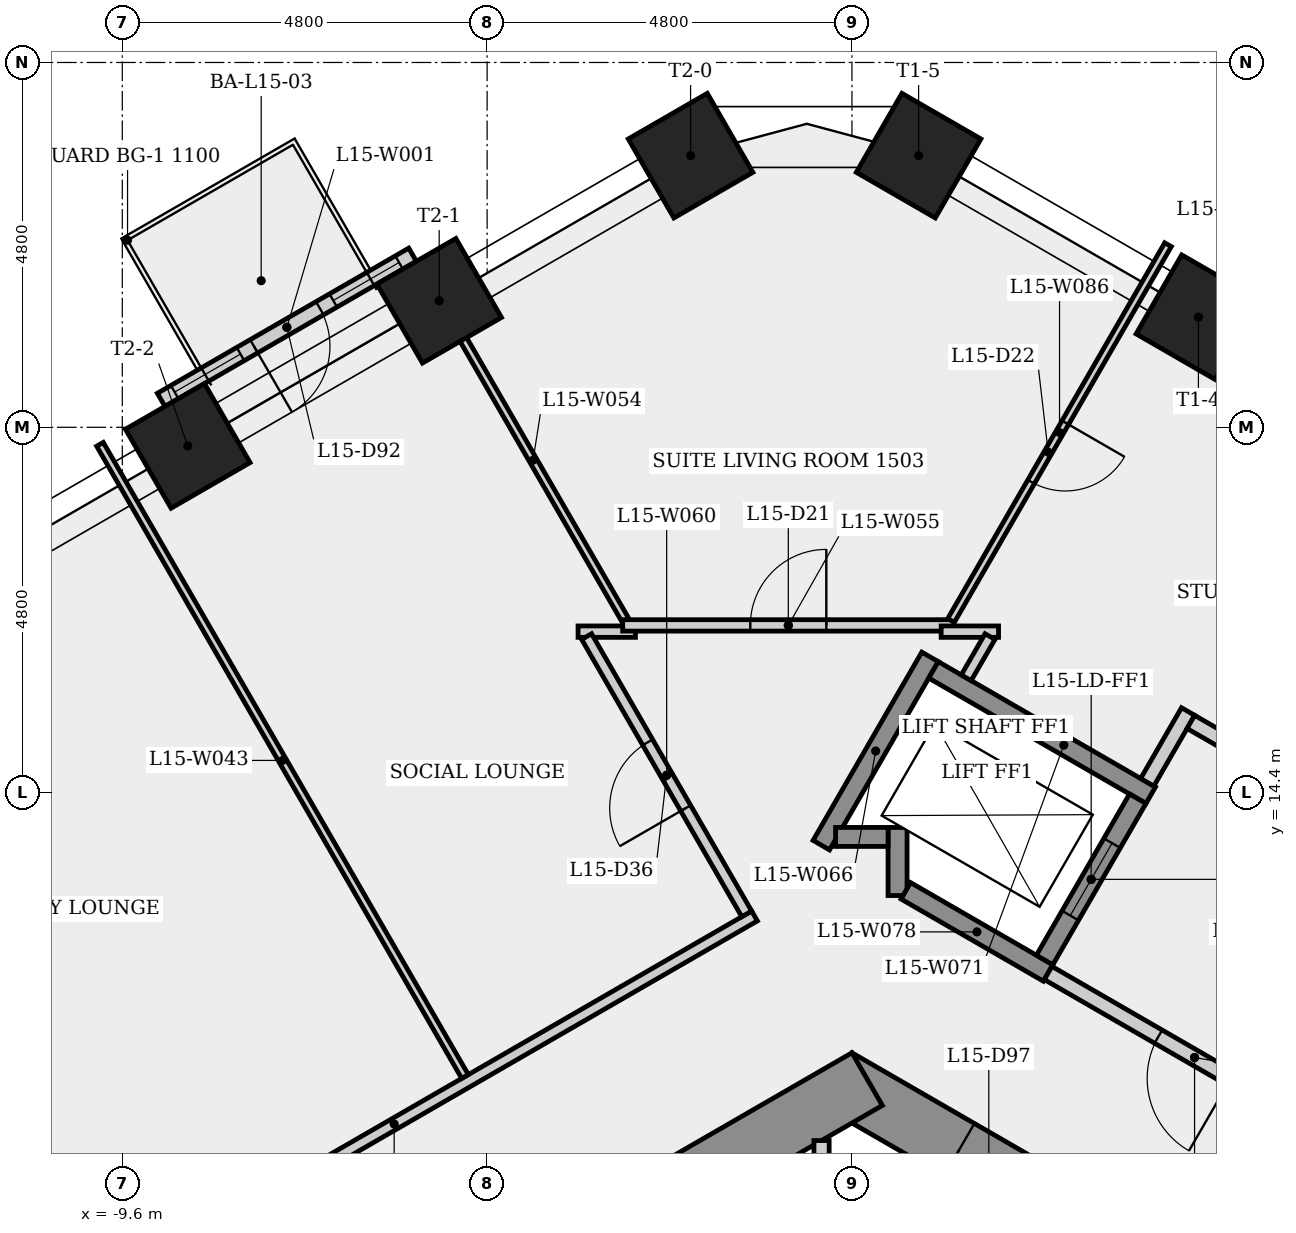
"""IFC4 building model, lengths in metres.
Left out: names, types, materials, properties, quantities, classifications, styles, units other than length and angle.
Written with IfcOpenShell. Run it as: python <this file> out.ifc"""

import sys

from ifc_helpers import new_model, si_unit, direction, frame, frame_2d, origin, origin_2d, place, context, subcontext, project, spatial, rectangle, extrude, element, fill, save


model = new_model("IFC4")
c1 = context("Model", 3, precision=1e-05, world=origin(), true_north=direction((0.0, 1.0)))
c2 = subcontext(c1, "Body", "Model", "MODEL_VIEW")
j1 = project(units=[si_unit("LENGTHUNIT", "METRE"), si_unit("PLANEANGLEUNIT", "RADIAN")], contexts=[c1])
p1 = place(None, origin())
s1 = spatial("IfcSite", under=j1, at=p1, CompositionType="ELEMENT")
p2 = place(p1, origin())
s2 = spatial("IfcBuilding", under=s1, at=p2, CompositionType="ELEMENT")
p3 = place(p2, frame((0.0, 0.0, 59.5)))
s3 = spatial("IfcBuildingStorey", under=s2, at=p3, CompositionType="ELEMENT", Elevation=59.5)
p4 = place(p3, frame((9.3, 5.138, 0.0), z_axis=(0.0, 0.0, 1.0), x_axis=(-0.866023993627, 0.500002442456, 0.0)))
e1 = element("IfcWall", 1, at=p4, inside=s3, PredefinedType="SHEAR", context=c2, shape_type="SweptSolid", body=[
    extrude(rectangle(XDim=10.97, YDim=0.8, at=frame_2d((5.485, 0.0))), origin(), (0.0, 0.0, 1.0), 3.4),
])
p5 = place(p4, frame((8.21, 0.0, 0.0)))
e2 = element("IfcOpeningElement", 2, at=p5, cuts=e1, PredefinedType="OPENING", context=c2, shape_type="SweptSolid", body=[
    extrude(rectangle(XDim=0.9, YDim=2.1, at=frame_2d((0.45, 1.05))), frame((0.0, 0.41, 0.0), z_axis=(0.0, -1.0, 0.0), x_axis=(1.0, 0.0, 0.0)), (0.0, 0.0, 1.0), 0.82),
])
p6 = place(p4, frame((2.126, 0.0, 0.0)))
e3 = element("IfcOpeningElement", 3, at=p6, cuts=e1, PredefinedType="OPENING", context=c2, shape_type="SweptSolid", body=[
    extrude(rectangle(XDim=0.9, YDim=2.1, at=frame_2d((0.45, 1.05))), frame((0.0, 0.41, 0.0), z_axis=(0.0, -1.0, 0.0), x_axis=(1.0, 0.0, 0.0)), (0.0, 0.0, 1.0), 0.82),
])
p7 = place(p3, frame((0.2, 10.623, 0.0), z_axis=(0.0, 0.0, 1.0), x_axis=(-0.866023993627, -0.500002442456, 0.0)))
e4 = element("IfcWall", 4, at=p7, inside=s3, PredefinedType="SHEAR", context=c2, shape_type="SweptSolid", body=[
    extrude(rectangle(XDim=10.97, YDim=0.8, at=frame_2d((5.485, 0.0))), origin(), (0.0, 0.0, 1.0), 3.4),
])
p8 = place(p7, frame((6.877, 0.0, 0.0)))
e5 = element("IfcOpeningElement", 5, at=p8, cuts=e4, PredefinedType="OPENING", context=c2, shape_type="SweptSolid", body=[
    extrude(rectangle(XDim=0.9, YDim=2.1, at=frame_2d((0.45, 1.05))), frame((0.0, 0.41, 0.0), z_axis=(0.0, -1.0, 0.0), x_axis=(1.0, 0.0, 0.0)), (0.0, 0.0, 1.0), 0.82),
])
for number, where, z_axis, x_axis in (
    (6, (4.558, 20.649, 0.0), (0.0, 0.0, 1.0), (0.5, 0.866, 0.0)),
    (7, (0.877, 22.774, 0.0), (0.0, 0.0, 1.0), (0.5, 0.866, 0.0)),
    (8, (-2.123, 22.774, 0.0), (0.0, 0.0, 1.0), (-0.5, 0.866, 0.0)),
    (9, (-5.431, 20.865, 0.0), (0.0, 0.0, 1.0), (-0.5, 0.866, 0.0)),
    (10, (-8.739, 18.955, 0.0), (0.0, 0.0, 1.0), (-0.5, 0.866, 0.0)),
):
    element("IfcColumn", number, at=place(p3, frame(where, z_axis=z_axis, x_axis=x_axis)), inside=s3, PredefinedType="COLUMN", context=c2, shape_type="SweptSolid", body=[
        extrude(rectangle(XDim=1.2, YDim=1.2, at=origin_2d()), origin(), (0.0, 0.0, 1.0), 3.4),
    ])
p9 = place(p3, frame((-5.781, 21.471, 0.0), z_axis=(0.0, 0.0, 1.0), x_axis=(-0.866007800909, -0.500030487836, 0.0)))
e11 = element("IfcWall", 11, at=p9, inside=s3, PredefinedType="SOLIDWALL", context=c2, shape_type="SweptSolid", body=[
    extrude(rectangle(XDim=3.819, YDim=0.2, at=frame_2d((1.91, 0.0))), origin(), (0.0, 0.0, 1.0), 3.4),
])
p10 = place(p9, frame((1.409, 0.0, 0.0)))
e12 = element("IfcOpeningElement", 12, at=p10, cuts=e11, PredefinedType="OPENING", context=c2, shape_type="SweptSolid", body=[
    extrude(rectangle(XDim=1.0, YDim=2.4, at=frame_2d((0.5, 1.2))), frame((0.0, 0.11, 0.0), z_axis=(0.0, -1.0, 0.0), x_axis=(1.0, 0.0, 0.0)), (0.0, 0.0, 1.0), 0.22),
])
p11 = place(p9, frame((0.205, 0.0, 0.9)))
e13 = element("IfcOpeningElement", 13, at=p11, cuts=e11, PredefinedType="OPENING", context=c2, shape_type="SweptSolid", body=[
    extrude(rectangle(XDim=1.0, YDim=1.5, at=frame_2d((0.5, 0.75))), frame((0.0, 0.11, 0.0), z_axis=(0.0, -1.0, 0.0), x_axis=(1.0, 0.0, 0.0)), (0.0, 0.0, 1.0), 0.22),
])
p12 = place(p9, frame((2.614, 0.0, 0.9)))
e14 = element("IfcOpeningElement", 14, at=p12, cuts=e11, PredefinedType="OPENING", context=c2, shape_type="SweptSolid", body=[
    extrude(rectangle(XDim=1.0, YDim=1.5, at=frame_2d((0.5, 0.75))), frame((0.0, 0.11, 0.0), z_axis=(0.0, -1.0, 0.0), x_axis=(1.0, 0.0, 0.0)), (0.0, 0.0, 1.0), 0.22),
])
p13 = place(p3, frame((-10.764, 7.295, 0.0), z_axis=(0.0, 0.0, 1.0), x_axis=(0.866028150195, 0.499995243048, 0.0)))
e15 = element("IfcWall", 15, at=p13, inside=s3, PredefinedType="PARTITIONING", context=c2, shape_type="SweptSolid", body=[
    extrude(rectangle(XDim=10.949, YDim=0.15, at=frame_2d((5.475, 0.0))), origin(), (0.0, 0.0, 1.0), 3.05),
])
p14 = place(p3, frame((-5.091, 10.657, 0.0), z_axis=(0.0, 0.0, 1.0), x_axis=(-0.499998937792, 0.866026017049, 0.0)))
e16 = element("IfcWall", 16, at=p14, inside=s3, PredefinedType="PARTITIONING", context=c2, shape_type="SweptSolid", body=[
    extrude(rectangle(XDim=9.605, YDim=0.1, at=frame_2d((4.803, 0.0))), origin(), (0.0, 0.0, 1.0), 3.05),
])
p15 = place(p3, frame((-3.604, 16.511, 0.0), z_axis=(0.0, 0.0, 1.0), x_axis=(1.0, 0.0, 0.0)))
e17 = element("IfcWall", 17, at=p15, inside=s3, PredefinedType="PARTITIONING", context=c2, shape_type="SweptSolid", body=[
    extrude(rectangle(XDim=0.755, YDim=0.15, at=frame_2d((0.377, 0.0))), origin(), (0.0, 0.0, 1.0), 3.05),
])
p16 = place(p3, frame((-2.979, 16.658, 0.0), z_axis=(0.0, 0.0, 1.0), x_axis=(-0.500021943523, 0.866012734315, 0.0)))
e18 = element("IfcWall", 18, at=p16, inside=s3, PredefinedType="PARTITIONING", context=c2, shape_type="SweptSolid", body=[
    extrude(rectangle(XDim=4.869, YDim=0.1, at=frame_2d((2.435, 0.0))), origin(), (0.0, 0.0, 1.0), 3.05),
])
p17 = place(p3, frame((-3.016, 16.593, 0.0), z_axis=(0.0, 0.0, 1.0), x_axis=(1.0, 0.0, 0.0)))
e19 = element("IfcWall", 19, at=p17, inside=s3, PredefinedType="PARTITIONING", context=c2, shape_type="SweptSolid", body=[
    extrude(rectangle(XDim=4.357, YDim=0.15, at=frame_2d((2.179, 0.0))), origin(), (0.0, 0.0, 1.0), 3.05),
])
p18 = place(p17, frame((1.679, 0.0, 0.0)))
e20 = element("IfcOpeningElement", 20, at=p18, cuts=e19, PredefinedType="OPENING", context=c2, shape_type="SweptSolid", body=[
    extrude(rectangle(XDim=1.0, YDim=2.1, at=frame_2d((0.5, 1.05))), frame((0.0, 0.085, 0.0), z_axis=(0.0, -1.0, 0.0), x_axis=(1.0, 0.0, 0.0)), (0.0, 0.0, 1.0), 0.17),
])
p19 = place(p3, frame((-1.385, 12.797, 0.0), z_axis=(0.0, 0.0, 1.0), x_axis=(-0.499996648386, 0.866027338831, 0.0)))
e21 = element("IfcWall", 21, at=p19, inside=s3, PredefinedType="PARTITIONING", context=c2, shape_type="SweptSolid", body=[
    extrude(rectangle(XDim=4.213, YDim=0.15, at=frame_2d((2.107, 0.0))), origin(), (0.0, 0.0, 1.0), 3.05),
])
p20 = place(p19, frame((1.607, 0.0, 0.0)))
e22 = element("IfcOpeningElement", 22, at=p20, cuts=e21, PredefinedType="OPENING", context=c2, shape_type="SweptSolid", body=[
    extrude(rectangle(XDim=1.0, YDim=2.1, at=frame_2d((0.5, 1.05))), frame((0.0, 0.085, 0.0), z_axis=(0.0, -1.0, 0.0), x_axis=(1.0, 0.0, 0.0)), (0.0, 0.0, 1.0), 0.17),
])
p21 = place(p3, frame((-0.4, 9.815, 0.0), z_axis=(0.0, 0.0, 1.0), x_axis=(0.0, -1.0, 0.0)))
e23 = element("IfcWall", 23, at=p21, inside=s3, PredefinedType="PARTITIONING", context=c2, shape_type="SweptSolid", body=[
    extrude(rectangle(XDim=4.54, YDim=0.2, at=frame_2d((2.27, 0.0))), origin(), (0.0, 0.0, 1.0), 3.05),
])
p22 = place(p3, frame((-0.403, 13.702, 0.0), z_axis=(0.0, 0.0, 1.0), x_axis=(0.499976111731, 0.866039195244, 0.0)))
e24 = element("IfcWall", 24, at=p22, inside=s3, PredefinedType="SHEAR", context=c2, shape_type="SweptSolid", body=[
    extrude(rectangle(XDim=2.861, YDim=0.25, at=frame_2d((1.43, 0.0))), origin(), (0.0, 0.0, 1.0), 3.05),
])
p23 = place(p3, frame((0.6, 13.039, 0.0), z_axis=(0.0, 0.0, 1.0), x_axis=(0.0, 1.0, 0.0)))
e25 = element("IfcWall", 25, at=p23, inside=s3, PredefinedType="SHEAR", context=c2, shape_type="SweptSolid", body=[
    extrude(rectangle(XDim=0.896, YDim=0.25, at=frame_2d((0.448, 0.0))), origin(), (0.0, 0.0, 1.0), 3.05),
])
p24 = place(p3, frame((0.475, 13.81, 0.0), z_axis=(0.0, 0.0, 1.0), x_axis=(-1.0, 0.0, 0.0)))
e26 = element("IfcWall", 26, at=p24, inside=s3, PredefinedType="SHEAR", context=c2, shape_type="SweptSolid", body=[
    extrude(rectangle(XDim=0.691, YDim=0.25, at=frame_2d((0.345, 0.0))), origin(), (0.0, 0.0, 1.0), 3.4),
])
p25 = place(p3, frame((1.073, 16.008, 0.0), z_axis=(0.0, 0.0, 1.0), x_axis=(0.866040211805, -0.499974350878, 0.0)))
e27 = element("IfcWall", 27, at=p25, inside=s3, PredefinedType="SHEAR", context=c2, shape_type="SweptSolid", body=[
    extrude(rectangle(XDim=3.3, YDim=0.25, at=frame_2d((1.65, 0.0))), origin(), (0.0, 0.0, 1.0), 3.05),
])
p26 = place(p3, frame((1.174, 16.511, 0.0), z_axis=(0.0, 0.0, 1.0), x_axis=(1.0, 0.0, 0.0)))
e28 = element("IfcWall", 28, at=p26, inside=s3, PredefinedType="PARTITIONING", context=c2, shape_type="SweptSolid", body=[
    extrude(rectangle(XDim=0.755, YDim=0.15, at=frame_2d((0.377, 0.0))), origin(), (0.0, 0.0, 1.0), 3.05),
])
p27 = place(p3, frame((1.816, 16.446, 0.0), z_axis=(0.0, 0.0, 1.0), x_axis=(-0.50008261738, -0.865977699363, 0.0)))
e29 = element("IfcWall", 29, at=p27, inside=s3, PredefinedType="PARTITIONING", context=c2, shape_type="SweptSolid", body=[
    extrude(rectangle(XDim=0.626, YDim=0.15, at=frame_2d((0.313, 0.0))), origin(), (0.0, 0.0, 1.0), 3.05),
])
p28 = place(p3, frame((2.581, 12.02, 0.0), z_axis=(0.0, 0.0, 1.0), x_axis=(-0.86603892542, 0.499976579108, 0.0)))
e30 = element("IfcWall", 30, at=p28, inside=s3, PredefinedType="SHEAR", context=c2, shape_type="SweptSolid", body=[
    extrude(rectangle(XDim=2.162, YDim=0.25, at=frame_2d((1.081, 0.0))), origin(), (0.0, 0.0, 1.0), 3.05),
])
p29 = place(p3, frame((2.535, 12.191, 0.0), z_axis=(0.0, 0.0, 1.0), x_axis=(0.500061746146, 0.865989751695, 0.0)))
e31 = element("IfcWall", 31, at=p29, inside=s3, PredefinedType="SHEAR", context=c2, shape_type="SweptSolid", body=[
    extrude(rectangle(XDim=2.45, YDim=0.25, at=frame_2d((1.225, 0.0))), origin(), (0.0, 0.0, 1.0), 3.4),
])
p30 = place(p29, frame((0.675, 0.0, 0.0)))
e32 = element("IfcOpeningElement", 32, at=p30, cuts=e31, PredefinedType="OPENING", context=c2, shape_type="SweptSolid", body=[
    extrude(rectangle(XDim=1.1, YDim=2.1, at=frame_2d((0.55, 1.05))), frame((0.0, 0.135, 0.0), z_axis=(0.0, -1.0, 0.0), x_axis=(1.0, 0.0, 0.0)), (0.0, 0.0, 1.0), 0.27),
])
p31 = place(p3, frame((3.885, 14.529, 0.0), z_axis=(0.0, 0.0, 1.0), x_axis=(0.499997628298, 0.866026773083, 0.0)))
e33 = element("IfcWall", 33, at=p31, inside=s3, PredefinedType="PARTITIONING", context=c2, shape_type="SweptSolid", body=[
    extrude(rectangle(XDim=1.075, YDim=0.2, at=frame_2d((0.538, 0.0))), origin(), (0.0, 0.0, 1.0), 3.05),
])
p32 = place(p3, frame((4.158, 21.602, 0.0), z_axis=(0.0, 0.0, 1.0), x_axis=(-0.500002556202, -0.866023927955, 0.0)))
e34 = element("IfcWall", 34, at=p32, inside=s3, PredefinedType="PARTITIONING", context=c2, shape_type="SweptSolid", body=[
    extrude(rectangle(XDim=5.709, YDim=0.1, at=frame_2d((2.854, 0.0))), origin(), (0.0, 0.0, 1.0), 3.05),
])
p33 = place(p32, frame((2.702, 0.0, 0.0)))
e35 = element("IfcOpeningElement", 35, at=p33, cuts=e34, PredefinedType="OPENING", context=c2, shape_type="SweptSolid", body=[
    extrude(rectangle(XDim=0.9, YDim=2.1, at=frame_2d((0.45, 1.05))), frame((0.0, 0.06, 0.0), z_axis=(0.0, -1.0, 0.0), x_axis=(1.0, 0.0, 0.0)), (0.0, 0.0, 1.0), 0.12),
])
p34 = place(p3, frame((4.459, 15.323, 0.0), z_axis=(0.0, 0.0, 1.0), x_axis=(0.866016039709, -0.500016218704, 0.0)))
e36 = element("IfcWall", 36, at=p34, inside=s3, PredefinedType="PARTITIONING", context=c2, shape_type="SweptSolid", body=[
    extrude(rectangle(XDim=4.7, YDim=0.2, at=frame_2d((2.35, 0.0))), origin(), (0.0, 0.0, 1.0), 3.05),
])
p35 = place(p3, frame((6.435, 9.795, 0.0), z_axis=(0.0, 0.0, 1.0), x_axis=(-0.866012907634, 0.500021643343, 0.0)))
e37 = element("IfcWall", 37, at=p35, inside=s3, PredefinedType="PARTITIONING", context=c2, shape_type="SweptSolid", body=[
    extrude(rectangle(XDim=4.45, YDim=0.2, at=frame_2d((2.225, 0.0))), origin(), (0.0, 0.0, 1.0), 3.05),
])
p36 = place(p35, frame((1.675, 0.0, 0.0)))
e38 = element("IfcOpeningElement", 38, at=p36, cuts=e37, PredefinedType="OPENING", context=c2, shape_type="SweptSolid", body=[
    extrude(rectangle(XDim=1.1, YDim=2.1, at=frame_2d((0.55, 1.05))), frame((0.0, 0.11, 0.0), z_axis=(0.0, -1.0, 0.0), x_axis=(1.0, 0.0, 0.0)), (0.0, 0.0, 1.0), 0.22),
])
p37 = place(p10, origin())
e39 = element("IfcDoor", 39, at=p37, inside=s3, OperationType="SINGLE_SWING_RIGHT", PredefinedType="DOOR", context=c2, shape_type="SweptSolid", body=[
    extrude(rectangle(XDim=1.0, YDim=2.4, at=frame_2d((0.5, 1.2))), frame((0.0, 0.025, 0.0), z_axis=(0.0, -1.0, 0.0), x_axis=(1.0, 0.0, 0.0)), (0.0, 0.0, 1.0), 0.05),
])
fill(e12, e39)
p38 = place(p11, origin())
e40 = element("IfcWindow", 40, at=p38, inside=s3, PartitioningType="SINGLE_PANEL", PredefinedType="WINDOW", context=c2, shape_type="SweptSolid", body=[
    extrude(rectangle(XDim=1.0, YDim=1.5, at=frame_2d((0.5, 0.75))), frame((0.0, 0.03, 0.0), z_axis=(0.0, -1.0, 0.0), x_axis=(1.0, 0.0, 0.0)), (0.0, 0.0, 1.0), 0.06),
])
fill(e13, e40)
p39 = place(p12, origin())
e41 = element("IfcWindow", 41, at=p39, inside=s3, PartitioningType="SINGLE_PANEL", PredefinedType="WINDOW", context=c2, shape_type="SweptSolid", body=[
    extrude(rectangle(XDim=1.0, YDim=1.5, at=frame_2d((0.5, 0.75))), frame((0.0, 0.03, 0.0), z_axis=(0.0, -1.0, 0.0), x_axis=(1.0, 0.0, 0.0)), (0.0, 0.0, 1.0), 0.06),
])
fill(e14, e41)
p40 = place(p36, origin())
e42 = element("IfcDoor", 42, at=p40, inside=s3, OperationType="SINGLE_SWING_LEFT", PredefinedType="DOOR", context=c2, shape_type="SweptSolid", body=[
    extrude(rectangle(XDim=1.1, YDim=2.1, at=frame_2d((0.55, 1.05))), frame((0.0, 0.025, 0.0), z_axis=(0.0, -1.0, 0.0), x_axis=(1.0, 0.0, 0.0)), (0.0, 0.0, 1.0), 0.05),
])
fill(e38, e42)
p41 = place(p30, origin())
e43 = element("IfcDoor", 43, at=p41, inside=s3, OperationType="SLIDING_TO_LEFT", PredefinedType="DOOR", context=c2, shape_type="SweptSolid", body=[
    extrude(rectangle(XDim=1.1, YDim=2.1, at=frame_2d((0.55, 1.05))), frame((0.0, 0.025, 0.0), z_axis=(0.0, -1.0, 0.0), x_axis=(1.0, 0.0, 0.0)), (0.0, 0.0, 1.0), 0.05),
])
fill(e32, e43)
p42 = place(p18, origin())
e44 = element("IfcDoor", 44, at=p42, inside=s3, OperationType="SINGLE_SWING_RIGHT", PredefinedType="DOOR", context=c2, shape_type="SweptSolid", body=[
    extrude(rectangle(XDim=1.0, YDim=2.1, at=frame_2d((0.5, 1.05))), frame((0.0, 0.025, 0.0), z_axis=(0.0, -1.0, 0.0), x_axis=(1.0, 0.0, 0.0)), (0.0, 0.0, 1.0), 0.05),
])
fill(e20, e44)
p43 = place(p33, origin())
e45 = element("IfcDoor", 45, at=p43, inside=s3, OperationType="SINGLE_SWING_LEFT", PredefinedType="DOOR", context=c2, shape_type="SweptSolid", body=[
    extrude(rectangle(XDim=0.9, YDim=2.1, at=frame_2d((0.45, 1.05))), frame((0.0, 0.025, 0.0), z_axis=(0.0, -1.0, 0.0), x_axis=(1.0, 0.0, 0.0)), (0.0, 0.0, 1.0), 0.05),
])
fill(e35, e45)
p44 = place(p20, origin())
e46 = element("IfcDoor", 46, at=p44, inside=s3, OperationType="SINGLE_SWING_LEFT", PredefinedType="DOOR", context=c2, shape_type="SweptSolid", body=[
    extrude(rectangle(XDim=1.0, YDim=2.1, at=frame_2d((0.5, 1.05))), frame((0.0, 0.025, 0.0), z_axis=(0.0, -1.0, 0.0), x_axis=(1.0, 0.0, 0.0)), (0.0, 0.0, 1.0), 0.05),
])
fill(e22, e46)
p45 = place(p5, origin())
e47 = element("IfcDoor", 47, at=p45, inside=s3, OperationType="SINGLE_SWING_RIGHT", PredefinedType="DOOR", context=c2, shape_type="SweptSolid", body=[
    extrude(rectangle(XDim=0.9, YDim=2.1, at=frame_2d((0.45, 1.05))), frame((0.0, 0.025, 0.0), z_axis=(0.0, -1.0, 0.0), x_axis=(1.0, 0.0, 0.0)), (0.0, 0.0, 1.0), 0.05),
])
fill(e2, e47)
save(model, sys.argv[1])
